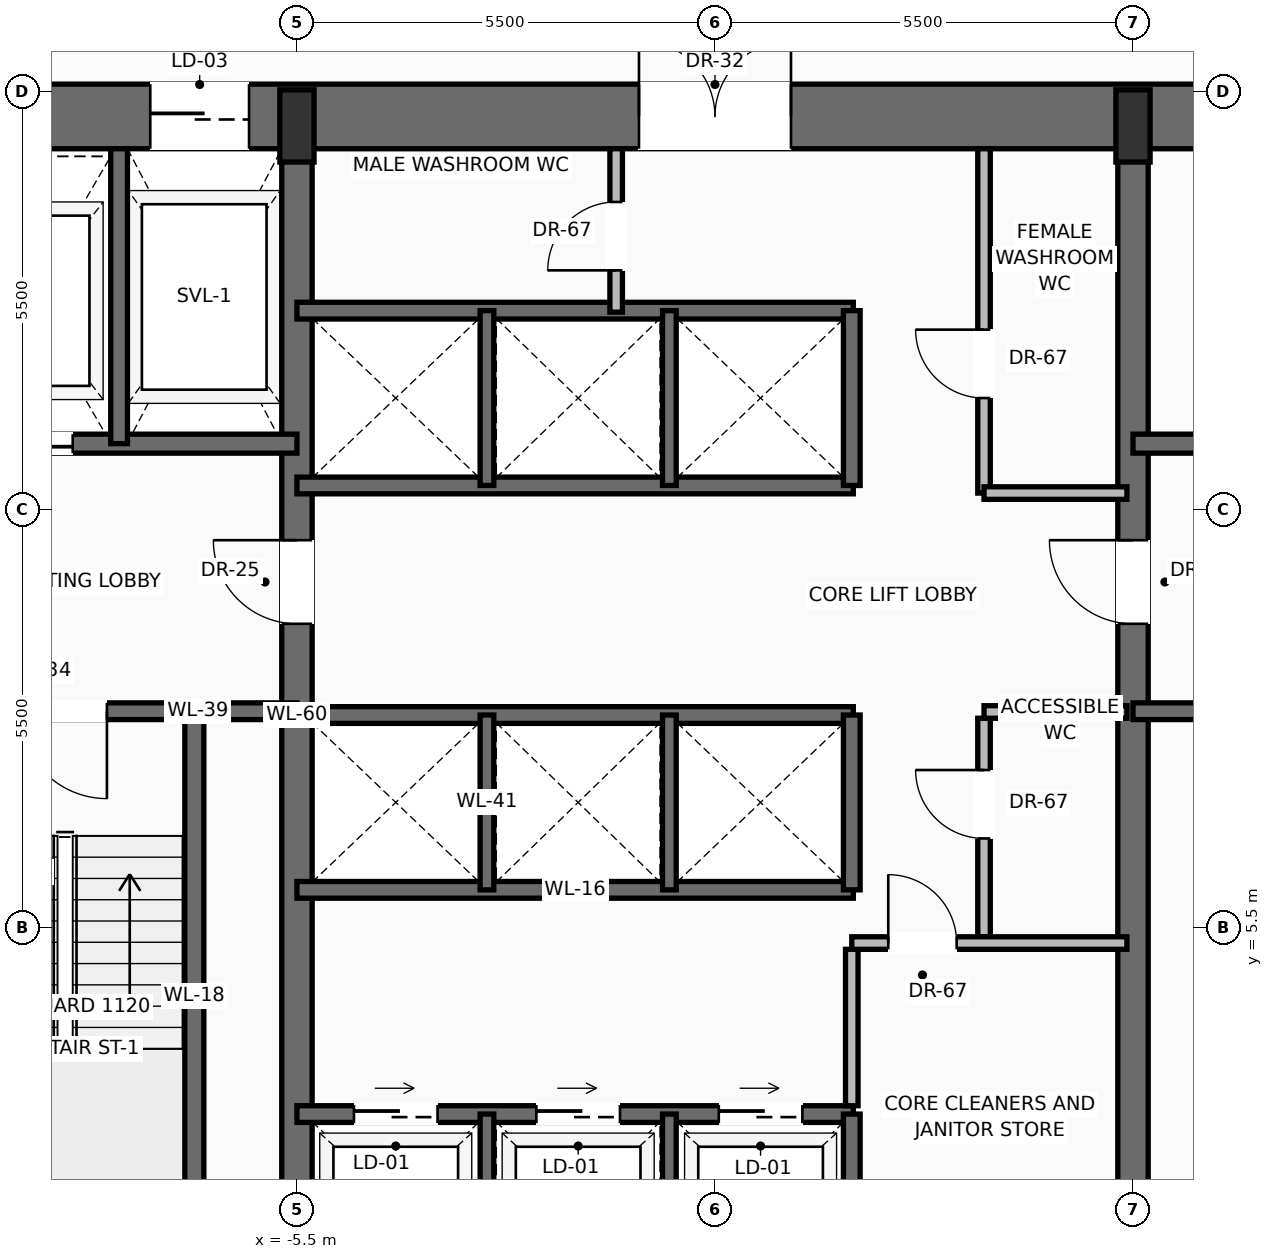
"""IFC4 building model, lengths in metres.
Left out: names, types, materials, properties, quantities, classifications, styles, units other than length and angle.
Written with IfcOpenShell. Run it as: python <this file> out.ifc"""

import sys

from ifc_helpers import new_model, si_unit, direction, frame, frame_2d, origin, origin_2d, place, context, subcontext, project, spatial, rectangle, extrude, source, transform, mapped, element, fill, save


model = new_model("IFC4")
c1 = context("Model", 3, precision=1e-05, world=origin(), true_north=direction((0.0, 1.0)))
c2 = subcontext(c1, "Body", "Model", "MODEL_VIEW")
j1 = project(units=[si_unit("LENGTHUNIT", "METRE"), si_unit("PLANEANGLEUNIT", "RADIAN")], contexts=[c1])
p1 = place(None, origin())
s1 = spatial("IfcSite", under=j1, at=p1, CompositionType="ELEMENT")
p2 = place(p1, origin())
s2 = spatial("IfcBuilding", under=s1, at=p2, CompositionType="ELEMENT")
p3 = place(p2, frame((0.0, 0.0, 68.2)))
s3 = spatial("IfcBuildingStorey", under=s2, at=p3, CompositionType="ELEMENT", Elevation=68.2)
p4 = place(p3, frame((-11.0, 16.175, 0.0), z_axis=(0.0, 0.0, 1.0), x_axis=(1.0, 0.0, 0.0)))
e1 = element("IfcWall", 1, at=p4, inside=s3, PredefinedType="SHEAR", context=c2, shape_type="SweptSolid", body=[
    extrude(rectangle(XDim=22.0, YDim=0.85, at=frame_2d((11.0, 0.0))), origin(), (0.0, 0.0, 1.0), 3.4),
])
p5 = place(p4, frame((3.57, 0.0, 0.0)))
e2 = element("IfcOpeningElement", 2, at=p5, cuts=e1, PredefinedType="OPENING", context=c2, shape_type="SweptSolid", body=[
    extrude(rectangle(XDim=1.3, YDim=2.3, at=frame_2d((0.65, 1.15))), frame((0.0, 0.435, 0.0), z_axis=(0.0, -1.0, 0.0), x_axis=(1.0, 0.0, 0.0)), (0.0, 0.0, 1.0), 0.87),
])
p6 = place(p4, frame((10.0, 0.0, 0.0)))
e3 = element("IfcOpeningElement", 3, at=p6, cuts=e1, PredefinedType="OPENING", context=c2, shape_type="SweptSolid", body=[
    extrude(rectangle(XDim=2.0, YDim=2.4, at=frame_2d((1.0, 1.2))), frame((0.0, 0.435, 0.0), z_axis=(0.0, -1.0, 0.0), x_axis=(1.0, 0.0, 0.0)), (0.0, 0.0, 1.0), 0.87),
])
p7 = place(p3, frame((-5.5, 0.425, 0.0), z_axis=(0.0, 0.0, 1.0), x_axis=(0.0, 1.0, 0.0)))
e4 = element("IfcWall", 4, at=p7, inside=s3, PredefinedType="SHEAR", context=c2, shape_type="SweptSolid", body=[
    extrude(rectangle(XDim=15.75, YDim=0.4, at=frame_2d((7.875, 0.0))), origin(), (0.0, 0.0, 1.0), 3.4),
])
p8 = place(p7, frame((9.075, 0.0, 0.0)))
e5 = element("IfcOpeningElement", 5, at=p8, cuts=e4, PredefinedType="OPENING", context=c2, shape_type="SweptSolid", body=[
    extrude(rectangle(XDim=1.1, YDim=2.2, at=frame_2d((0.55, 1.1))), frame((0.0, 0.21, 0.0), z_axis=(0.0, -1.0, 0.0), x_axis=(1.0, 0.0, 0.0)), (0.0, 0.0, 1.0), 0.42),
])
p9 = place(p3, frame((5.5, 0.425, 0.0), z_axis=(0.0, 0.0, 1.0), x_axis=(0.0, 1.0, 0.0)))
e6 = element("IfcWall", 6, at=p9, inside=s3, PredefinedType="SHEAR", context=c2, shape_type="SweptSolid", body=[
    extrude(rectangle(XDim=15.75, YDim=0.4, at=frame_2d((7.875, 0.0))), origin(), (0.0, 0.0, 1.0), 3.4),
])
p10 = place(p9, frame((9.075, 0.0, 0.0)))
e7 = element("IfcOpeningElement", 7, at=p10, cuts=e6, PredefinedType="OPENING", context=c2, shape_type="SweptSolid", body=[
    extrude(rectangle(XDim=1.1, YDim=2.2, at=frame_2d((0.55, 1.1))), frame((0.0, 0.21, 0.0), z_axis=(0.0, -1.0, 0.0), x_axis=(1.0, 0.0, 0.0)), (0.0, 0.0, 1.0), 0.42),
])
m1 = source(origin(), c2, "Body", "SweptSolid", [
    extrude(rectangle(XDim=0.45, YDim=0.95, at=origin_2d()), origin(), (0.0, 0.0, 1.0), 3.7),
])
for number, where, z_axis, x_axis in (
    (8, (-5.5, 16.05, 0.0), (0.0, 0.0, 1.0), (1.0, 0.0, 0.0)),
    (9, (5.5, 16.05, 0.0), (0.0, 0.0, 1.0), (1.0, 0.0, 0.0)),
):
    element("IfcColumn", number, at=place(p3, frame(where, z_axis=z_axis, x_axis=x_axis)), inside=s3, PredefinedType="PILASTER", context=c2, shape_type="MappedRepresentation", body=[
        mapped(m1, transform((0.0, 0.0, 0.0), scale=1.0)),
    ])
p11 = place(p3, frame((-6.85, 0.85, 0.0), z_axis=(0.0, 0.0, 1.0), x_axis=(0.0, 1.0, 0.0)))
e10 = element("IfcWall", 10, at=p11, inside=s3, PredefinedType="SOLIDWALL", context=c2, shape_type="SweptSolid", body=[
    extrude(rectangle(XDim=7.5, YDim=0.25, at=frame_2d((3.75, 0.0))), origin(), (0.0, 0.0, 1.0), 3.4),
])
p12 = place(p3, frame((-5.5, 8.35, 0.0), z_axis=(0.0, 0.0, 1.0), x_axis=(-1.0, 0.0, 0.0)))
e11 = element("IfcWall", 11, at=p12, inside=s3, PredefinedType="SOLIDWALL", context=c2, shape_type="SweptSolid", body=[
    extrude(rectangle(XDim=4.65, YDim=0.22, at=frame_2d((2.325, 0.0))), origin(), (0.0, 0.0, 1.0), 3.4),
])
p13 = place(p12, frame((2.5, 0.0, 0.0)))
e12 = element("IfcOpeningElement", 12, at=p13, cuts=e11, PredefinedType="OPENING", context=c2, shape_type="SweptSolid", body=[
    extrude(rectangle(XDim=1.15, YDim=2.2, at=frame_2d((0.575, 1.1))), frame((0.0, 0.12, 0.0), z_axis=(0.0, -1.0, 0.0), x_axis=(1.0, 0.0, 0.0)), (0.0, 0.0, 1.0), 0.24),
])
p14 = place(p3, frame((-5.5, 11.87, 0.0), z_axis=(0.0, 0.0, 1.0), x_axis=(-1.0, 0.0, 0.0)))
e13 = element("IfcWall", 13, at=p14, inside=s3, PredefinedType="SOLIDWALL", context=c2, shape_type="SweptSolid", body=[
    extrude(rectangle(XDim=4.65, YDim=0.25, at=frame_2d((2.325, 0.0))), origin(), (0.0, 0.0, 1.0), 3.4),
])
p15 = place(p14, frame((2.95, 0.0, 0.0)))
e14 = element("IfcOpeningElement", 14, at=p15, cuts=e13, PredefinedType="OPENING", context=c2, shape_type="SweptSolid", body=[
    extrude(rectangle(XDim=1.2, YDim=2.25, at=frame_2d((0.6, 1.125))), frame((0.0, 0.135, 0.0), z_axis=(0.0, -1.0, 0.0), x_axis=(1.0, 0.0, 0.0)), (0.0, 0.0, 1.0), 0.27),
])
p16 = place(p3, frame((-7.84, 11.87, 0.0), z_axis=(0.0, 0.0, 1.0), x_axis=(0.0, 1.0, 0.0)))
e15 = element("IfcWall", 15, at=p16, inside=s3, PredefinedType="SOLIDWALL", context=c2, shape_type="SweptSolid", body=[
    extrude(rectangle(XDim=3.88, YDim=0.22, at=frame_2d((1.94, 0.0))), origin(), (0.0, 0.0, 1.0), 3.4),
])
p17 = place(p3, frame((10.15, 8.35, 0.0), z_axis=(0.0, 0.0, 1.0), x_axis=(-1.0, 0.0, 0.0)))
e16 = element("IfcWall", 16, at=p17, inside=s3, PredefinedType="SOLIDWALL", context=c2, shape_type="SweptSolid", body=[
    extrude(rectangle(XDim=4.65, YDim=0.22, at=frame_2d((2.325, 0.0))), origin(), (0.0, 0.0, 1.0), 3.4),
])
p18 = place(p17, frame((1.0, 0.0, 0.0)))
e17 = element("IfcOpeningElement", 17, at=p18, cuts=e16, PredefinedType="OPENING", context=c2, shape_type="SweptSolid", body=[
    extrude(rectangle(XDim=1.15, YDim=2.2, at=frame_2d((0.575, 1.1))), frame((0.0, 0.12, 0.0), z_axis=(0.0, -1.0, 0.0), x_axis=(1.0, 0.0, 0.0)), (0.0, 0.0, 1.0), 0.24),
])
p19 = place(p3, frame((10.15, 11.87, 0.0), z_axis=(0.0, 0.0, 1.0), x_axis=(-1.0, 0.0, 0.0)))
e18 = element("IfcWall", 18, at=p19, inside=s3, PredefinedType="SOLIDWALL", context=c2, shape_type="SweptSolid", body=[
    extrude(rectangle(XDim=4.65, YDim=0.25, at=frame_2d((2.325, 0.0))), origin(), (0.0, 0.0, 1.0), 3.4),
])
p20 = place(p19, frame((0.5, 0.0, 0.0)))
e19 = element("IfcOpeningElement", 19, at=p20, cuts=e18, PredefinedType="OPENING", context=c2, shape_type="SweptSolid", body=[
    extrude(rectangle(XDim=1.2, YDim=2.25, at=frame_2d((0.6, 1.125))), frame((0.0, 0.135, 0.0), z_axis=(0.0, -1.0, 0.0), x_axis=(1.0, 0.0, 0.0)), (0.0, 0.0, 1.0), 0.27),
])
p21 = place(p3, frame((-5.5, 3.05, 0.0), z_axis=(0.0, 0.0, 1.0), x_axis=(1.0, 0.0, 0.0)))
e20 = element("IfcWall", 20, at=p21, inside=s3, PredefinedType="SOLIDWALL", context=c2, shape_type="SweptSolid", body=[
    extrude(rectangle(XDim=7.32, YDim=0.22, at=frame_2d((3.66, 0.0))), origin(), (0.0, 0.0, 1.0), 3.4),
])
p22 = place(p21, frame((0.75, 0.0, 0.0)))
e21 = element("IfcOpeningElement", 21, at=p22, cuts=e20, PredefinedType="OPENING", context=c2, shape_type="SweptSolid", body=[
    extrude(rectangle(XDim=1.1, YDim=2.2, at=frame_2d((0.55, 1.1))), frame((0.0, 0.12, 0.0), z_axis=(0.0, -1.0, 0.0), x_axis=(1.0, 0.0, 0.0)), (0.0, 0.0, 1.0), 0.24),
])
p23 = place(p21, frame((3.15, 0.0, 0.0)))
e22 = element("IfcOpeningElement", 22, at=p23, cuts=e20, PredefinedType="OPENING", context=c2, shape_type="SweptSolid", body=[
    extrude(rectangle(XDim=1.1, YDim=2.2, at=frame_2d((0.55, 1.1))), frame((0.0, 0.12, 0.0), z_axis=(0.0, -1.0, 0.0), x_axis=(1.0, 0.0, 0.0)), (0.0, 0.0, 1.0), 0.24),
])
p24 = place(p21, frame((5.55, 0.0, 0.0)))
e23 = element("IfcOpeningElement", 23, at=p24, cuts=e20, PredefinedType="OPENING", context=c2, shape_type="SweptSolid", body=[
    extrude(rectangle(XDim=1.1, YDim=2.2, at=frame_2d((0.55, 1.1))), frame((0.0, 0.12, 0.0), z_axis=(0.0, -1.0, 0.0), x_axis=(1.0, 0.0, 0.0)), (0.0, 0.0, 1.0), 0.24),
])
p25 = place(p3, frame((1.8, 0.85, 0.0), z_axis=(0.0, 0.0, 1.0), x_axis=(0.0, 1.0, 0.0)))
e24 = element("IfcWall", 24, at=p25, inside=s3, PredefinedType="SOLIDWALL", context=c2, shape_type="SweptSolid", body=[
    extrude(rectangle(XDim=2.2, YDim=0.22, at=frame_2d((1.1, 0.0))), origin(), (0.0, 0.0, 1.0), 3.4),
])
for number, where, z_axis, x_axis in (
    (25, (-3.0, 0.85, 0.0), (0.0, 0.0, 1.0), (0.0, 1.0, 0.0)),
    (26, (-0.6, 0.85, 0.0), (0.0, 0.0, 1.0), (0.0, 1.0, 0.0)),
):
    element("IfcWall", number, at=place(p3, frame(where, z_axis=z_axis, x_axis=x_axis)), inside=s3, PredefinedType="SOLIDWALL", context=c2, shape_type="SweptSolid", body=[
        extrude(rectangle(XDim=2.2, YDim=0.18, at=frame_2d((1.1, 0.0))), origin(), (0.0, 0.0, 1.0), 3.4),
    ])
p26 = place(p3, frame((1.8, 3.16, 0.0), z_axis=(0.0, 0.0, 1.0), x_axis=(0.0, 1.0, 0.0)))
e27 = element("IfcWall", 27, at=p26, inside=s3, PredefinedType="PARTITIONING", context=c2, shape_type="SweptSolid", body=[
    extrude(rectangle(XDim=2.058, YDim=0.165, at=frame_2d((1.029, 0.0))), origin(), (0.0, 0.0, 1.0), 3.392),
])
p27 = place(p3, frame((3.54, 5.383, 0.0), z_axis=(0.0, 0.0, 1.0), x_axis=(0.0, 1.0, 0.0)))
e28 = element("IfcWall", 28, at=p27, inside=s3, PredefinedType="PARTITIONING", context=c2, shape_type="SweptSolid", body=[
    extrude(rectangle(XDim=2.875, YDim=0.165, at=frame_2d((1.438, 0.0))), origin(), (0.0, 0.0, 1.0), 3.392),
])
p28 = place(p27, frame((1.294, 0.0, 0.0)))
e29 = element("IfcOpeningElement", 29, at=p28, cuts=e28, PredefinedType="OPENING", context=c2, shape_type="SweptSolid", body=[
    extrude(rectangle(XDim=0.9, YDim=2.1, at=frame_2d((0.45, 1.05))), frame((0.0, 0.093, 0.0), z_axis=(0.0, -1.0, 0.0), x_axis=(1.0, 0.0, 0.0)), (0.0, 0.0, 1.0), 0.185),
])
p29 = place(p3, frame((3.54, 8.34, 0.0), z_axis=(0.0, 0.0, 1.0), x_axis=(1.0, 0.0, 0.0)))
e30 = element("IfcWall", 30, at=p29, inside=s3, PredefinedType="PARTITIONING", context=c2, shape_type="SweptSolid", body=[
    extrude(rectangle(XDim=1.88, YDim=0.165, at=frame_2d((0.94, 0.0))), origin(), (0.0, 0.0, 1.0), 3.392),
])
p30 = place(p3, frame((1.8, 5.3, 0.0), z_axis=(0.0, 0.0, 1.0), x_axis=(1.0, 0.0, 0.0)))
e31 = element("IfcWall", 31, at=p30, inside=s3, PredefinedType="PARTITIONING", context=c2, shape_type="SweptSolid", body=[
    extrude(rectangle(XDim=3.62, YDim=0.165, at=frame_2d((1.81, 0.0))), origin(), (0.0, 0.0, 1.0), 3.392),
])
p31 = place(p30, frame((0.48, 0.0, 0.0)))
e32 = element("IfcOpeningElement", 32, at=p31, cuts=e31, PredefinedType="OPENING", context=c2, shape_type="SweptSolid", body=[
    extrude(rectangle(XDim=0.9, YDim=2.1, at=frame_2d((0.45, 1.05))), frame((0.0, 0.093, 0.0), z_axis=(0.0, -1.0, 0.0), x_axis=(1.0, 0.0, 0.0)), (0.0, 0.0, 1.0), 0.185),
])
for number, where, z_axis, x_axis in (
    (33, (-5.5, 6.0, 0.0), (0.0, 0.0, 1.0), (1.0, 0.0, 0.0)),
    (34, (-5.5, 8.3, 0.0), (0.0, 0.0, 1.0), (1.0, 0.0, 0.0)),
):
    element("IfcWall", number, at=place(p3, frame(where, z_axis=z_axis, x_axis=x_axis)), inside=s3, PredefinedType="SOLIDWALL", context=c2, shape_type="SweptSolid", body=[
        extrude(rectangle(XDim=7.32, YDim=0.22, at=frame_2d((3.66, 0.0))), origin(), (0.0, 0.0, 1.0), 3.4),
    ])
p32 = place(p3, frame((1.8, 6.0, 0.0), z_axis=(0.0, 0.0, 1.0), x_axis=(0.0, 1.0, 0.0)))
e35 = element("IfcWall", 35, at=p32, inside=s3, PredefinedType="SOLIDWALL", context=c2, shape_type="SweptSolid", body=[
    extrude(rectangle(XDim=2.3, YDim=0.22, at=frame_2d((1.15, 0.0))), origin(), (0.0, 0.0, 1.0), 3.4),
])
for number, where, z_axis, x_axis in (
    (36, (-3.0, 6.0, 0.0), (0.0, 0.0, 1.0), (0.0, 1.0, 0.0)),
    (37, (-0.6, 6.0, 0.0), (0.0, 0.0, 1.0), (0.0, 1.0, 0.0)),
):
    element("IfcWall", number, at=place(p3, frame(where, z_axis=z_axis, x_axis=x_axis)), inside=s3, PredefinedType="SOLIDWALL", context=c2, shape_type="SweptSolid", body=[
        extrude(rectangle(XDim=2.3, YDim=0.18, at=frame_2d((1.15, 0.0))), origin(), (0.0, 0.0, 1.0), 3.4),
    ])
for number, where, z_axis, x_axis in (
    (38, (-5.5, 11.32, 0.0), (0.0, 0.0, 1.0), (1.0, 0.0, 0.0)),
    (39, (-5.5, 13.62, 0.0), (0.0, 0.0, 1.0), (1.0, 0.0, 0.0)),
):
    element("IfcWall", number, at=place(p3, frame(where, z_axis=z_axis, x_axis=x_axis)), inside=s3, PredefinedType="SOLIDWALL", context=c2, shape_type="SweptSolid", body=[
        extrude(rectangle(XDim=7.32, YDim=0.22, at=frame_2d((3.66, 0.0))), origin(), (0.0, 0.0, 1.0), 3.4),
    ])
p33 = place(p3, frame((1.8, 11.32, 0.0), z_axis=(0.0, 0.0, 1.0), x_axis=(0.0, 1.0, 0.0)))
e40 = element("IfcWall", 40, at=p33, inside=s3, PredefinedType="SOLIDWALL", context=c2, shape_type="SweptSolid", body=[
    extrude(rectangle(XDim=2.3, YDim=0.22, at=frame_2d((1.15, 0.0))), origin(), (0.0, 0.0, 1.0), 3.4),
])
for number, where, z_axis, x_axis in (
    (41, (-3.0, 11.32, 0.0), (0.0, 0.0, 1.0), (0.0, 1.0, 0.0)),
    (42, (-0.6, 11.32, 0.0), (0.0, 0.0, 1.0), (0.0, 1.0, 0.0)),
):
    element("IfcWall", number, at=place(p3, frame(where, z_axis=z_axis, x_axis=x_axis)), inside=s3, PredefinedType="SOLIDWALL", context=c2, shape_type="SweptSolid", body=[
        extrude(rectangle(XDim=2.3, YDim=0.18, at=frame_2d((1.15, 0.0))), origin(), (0.0, 0.0, 1.0), 3.4),
    ])
p34 = place(p3, frame((-1.3, 13.6, 0.0), z_axis=(0.0, 0.0, 1.0), x_axis=(0.0, 1.0, 0.0)))
e43 = element("IfcWall", 43, at=p34, inside=s3, PredefinedType="PARTITIONING", context=c2, shape_type="SweptSolid", body=[
    extrude(rectangle(XDim=2.15, YDim=0.165, at=frame_2d((1.075, 0.0))), origin(), (0.0, 0.0, 1.0), 3.392),
])
p35 = place(p34, frame((0.55, 0.0, 0.0)))
e44 = element("IfcOpeningElement", 44, at=p35, cuts=e43, PredefinedType="OPENING", context=c2, shape_type="SweptSolid", body=[
    extrude(rectangle(XDim=0.9, YDim=2.1, at=frame_2d((0.45, 1.05))), frame((0.0, 0.093, 0.0), z_axis=(0.0, -1.0, 0.0), x_axis=(1.0, 0.0, 0.0)), (0.0, 0.0, 1.0), 0.185),
])
p36 = place(p3, frame((3.54, 11.22, 0.0), z_axis=(0.0, 0.0, 1.0), x_axis=(0.0, 1.0, 0.0)))
e45 = element("IfcWall", 45, at=p36, inside=s3, PredefinedType="PARTITIONING", context=c2, shape_type="SweptSolid", body=[
    extrude(rectangle(XDim=4.53, YDim=0.165, at=frame_2d((2.265, 0.0))), origin(), (0.0, 0.0, 1.0), 3.392),
])
p37 = place(p36, frame((1.25, 0.0, 0.0)))
e46 = element("IfcOpeningElement", 46, at=p37, cuts=e45, PredefinedType="OPENING", context=c2, shape_type="SweptSolid", body=[
    extrude(rectangle(XDim=0.9, YDim=2.1, at=frame_2d((0.45, 1.05))), frame((0.0, 0.093, 0.0), z_axis=(0.0, -1.0, 0.0), x_axis=(1.0, 0.0, 0.0)), (0.0, 0.0, 1.0), 0.185),
])
p38 = place(p3, frame((3.54, 11.22, 0.0), z_axis=(0.0, 0.0, 1.0), x_axis=(1.0, 0.0, 0.0)))
e47 = element("IfcWall", 47, at=p38, inside=s3, PredefinedType="PARTITIONING", context=c2, shape_type="SweptSolid", body=[
    extrude(rectangle(XDim=1.88, YDim=0.165, at=frame_2d((0.94, 0.0))), origin(), (0.0, 0.0, 1.0), 3.392),
])
m2 = source(origin(), c2, "Body", "SweptSolid", [
    extrude(rectangle(XDim=1.15, YDim=2.2, at=frame_2d((0.575, 1.1))), frame((0.0, 0.025, 0.0), z_axis=(0.0, -1.0, 0.0), x_axis=(1.0, 0.0, 0.0)), (0.0, 0.0, 1.0), 0.05),
])
p39 = place(p13, origin())
e48 = element("IfcDoor", 48, at=p39, inside=s3, OperationType="SINGLE_SWING_LEFT", PredefinedType="DOOR", context=c2, shape_type="MappedRepresentation", body=[
    mapped(m2, transform((0.0, 0.0, 0.0), scale=1.0)),
])
fill(e12, e48)
m3 = source(origin(), c2, "Body", "SweptSolid", [
    extrude(rectangle(XDim=1.1, YDim=2.2, at=frame_2d((0.55, 1.1))), frame((0.0, 0.025, 0.0), z_axis=(0.0, -1.0, 0.0), x_axis=(1.0, 0.0, 0.0)), (0.0, 0.0, 1.0), 0.05),
])
p40 = place(p8, origin())
e49 = element("IfcDoor", 49, at=p40, inside=s3, OperationType="SINGLE_SWING_RIGHT", PredefinedType="DOOR", context=c2, shape_type="MappedRepresentation", body=[
    mapped(m3, transform((0.0, 0.0, 0.0), scale=1.0)),
])
fill(e5, e49)
m4 = source(origin(), c2, "Body", "SweptSolid", [
    extrude(rectangle(XDim=1.2, YDim=2.25, at=frame_2d((0.6, 1.125))), frame((0.0, 0.025, 0.0), z_axis=(0.0, -1.0, 0.0), x_axis=(1.0, 0.0, 0.0)), (0.0, 0.0, 1.0), 0.05),
])
p41 = place(p15, origin())
e50 = element("IfcDoor", 50, at=p41, inside=s3, OperationType="SLIDING_TO_LEFT", PredefinedType="DOOR", context=c2, shape_type="MappedRepresentation", body=[
    mapped(m4, transform((0.0, 0.0, 0.0), scale=1.0)),
])
fill(e14, e50)
m5 = source(origin(), c2, "Body", "SweptSolid", [
    extrude(rectangle(XDim=1.3, YDim=2.3, at=frame_2d((0.65, 1.15))), frame((0.0, 0.025, 0.0), z_axis=(0.0, -1.0, 0.0), x_axis=(1.0, 0.0, 0.0)), (0.0, 0.0, 1.0), 0.05),
])
p42 = place(p5, origin())
e51 = element("IfcDoor", 51, at=p42, inside=s3, OperationType="SLIDING_TO_RIGHT", PredefinedType="DOOR", context=c2, shape_type="MappedRepresentation", body=[
    mapped(m5, transform((0.0, 0.0, 0.0), scale=1.0)),
])
fill(e2, e51)
p43 = place(p10, origin())
e52 = element("IfcDoor", 52, at=p43, inside=s3, OperationType="SINGLE_SWING_RIGHT", PredefinedType="DOOR", context=c2, shape_type="MappedRepresentation", body=[
    mapped(m3, transform((0.0, 0.0, 0.0), scale=1.0)),
])
fill(e7, e52)
m6 = source(origin(), c2, "Body", "SweptSolid", [
    extrude(rectangle(XDim=2.0, YDim=2.4, at=frame_2d((1.0, 1.2))), frame((0.0, 0.025, 0.0), z_axis=(0.0, -1.0, 0.0), x_axis=(1.0, 0.0, 0.0)), (0.0, 0.0, 1.0), 0.05),
])
p44 = place(p6, origin())
e53 = element("IfcDoor", 53, at=p44, inside=s3, OperationType="DOUBLE_DOOR_SINGLE_SWING", PredefinedType="DOOR", context=c2, shape_type="MappedRepresentation", body=[
    mapped(m6, transform((0.0, 0.0, 0.0), scale=1.0)),
])
fill(e3, e53)
m7 = source(origin(), c2, "Body", "SweptSolid", [
    extrude(rectangle(XDim=1.1, YDim=2.2, at=frame_2d((0.55, 1.1))), frame((0.0, 0.025, 0.0), z_axis=(0.0, -1.0, 0.0), x_axis=(1.0, 0.0, 0.0)), (0.0, 0.0, 1.0), 0.05),
])
p45 = place(p22, origin())
e54 = element("IfcDoor", 54, at=p45, inside=s3, OperationType="SLIDING_TO_RIGHT", PredefinedType="DOOR", context=c2, shape_type="MappedRepresentation", body=[
    mapped(m7, transform((0.0, 0.0, 0.0), scale=1.0)),
])
fill(e21, e54)
p46 = place(p23, origin())
e55 = element("IfcDoor", 55, at=p46, inside=s3, OperationType="SLIDING_TO_RIGHT", PredefinedType="DOOR", context=c2, shape_type="MappedRepresentation", body=[
    mapped(m7, transform((0.0, 0.0, 0.0), scale=1.0)),
])
fill(e22, e55)
p47 = place(p24, origin())
e56 = element("IfcDoor", 56, at=p47, inside=s3, OperationType="SLIDING_TO_RIGHT", PredefinedType="DOOR", context=c2, shape_type="MappedRepresentation", body=[
    mapped(m7, transform((0.0, 0.0, 0.0), scale=1.0)),
])
fill(e23, e56)
m8 = source(origin(), c2, "Body", "SweptSolid", [
    extrude(rectangle(XDim=0.9, YDim=2.1, at=frame_2d((0.45, 1.05))), frame((0.0, 0.025, 0.0), z_axis=(0.0, -1.0, 0.0), x_axis=(1.0, 0.0, 0.0)), (0.0, 0.0, 1.0), 0.05),
])
p48 = place(p31, origin())
e57 = element("IfcDoor", 57, at=p48, inside=s3, OperationType="SINGLE_SWING_LEFT", PredefinedType="DOOR", context=c2, shape_type="MappedRepresentation", body=[
    mapped(m8, transform((0.0, 0.0, 0.0), scale=1.0)),
])
fill(e32, e57)
p49 = place(p28, origin())
e58 = element("IfcDoor", 58, at=p49, inside=s3, OperationType="SINGLE_SWING_RIGHT", PredefinedType="DOOR", context=c2, shape_type="MappedRepresentation", body=[
    mapped(m8, transform((0.0, 0.0, 0.0), scale=1.0)),
])
fill(e29, e58)
p50 = place(p35, origin())
e59 = element("IfcDoor", 59, at=p50, inside=s3, OperationType="SINGLE_SWING_LEFT", PredefinedType="DOOR", context=c2, shape_type="MappedRepresentation", body=[
    mapped(m8, transform((0.0, 0.0, 0.0), scale=1.0)),
])
fill(e44, e59)
p51 = place(p37, origin())
e60 = element("IfcDoor", 60, at=p51, inside=s3, OperationType="SINGLE_SWING_RIGHT", PredefinedType="DOOR", context=c2, shape_type="MappedRepresentation", body=[
    mapped(m8, transform((0.0, 0.0, 0.0), scale=1.0)),
])
fill(e46, e60)
save(model, sys.argv[1])
